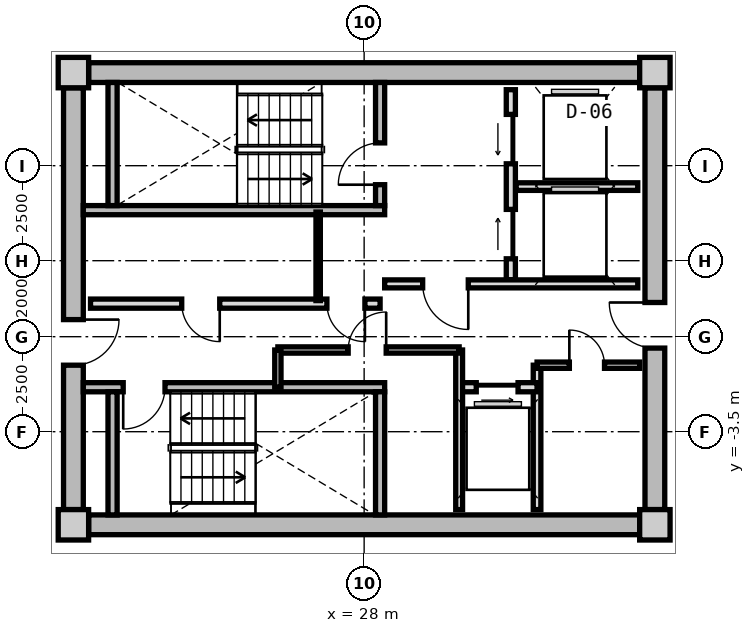
"""IFC4 building model, lengths in metres.
Left out: names, types, materials, properties, quantities, classifications, styles, units other than length and angle.
Written with IfcOpenShell. Run it as: python <this file> out.ifc"""

import sys

from ifc_helpers import new_model, si_unit, direction, frame, frame_2d, origin, origin_2d, place, context, subcontext, project, spatial, rectangle, extrude, source, transform, mapped, element, fill, save


model = new_model("IFC4")
c1 = context("Model", 3, precision=1e-05, world=origin(), true_north=direction((0.0, 1.0)))
c2 = subcontext(c1, "Body", "Model", "MODEL_VIEW")
j1 = project(units=[si_unit("LENGTHUNIT", "METRE"), si_unit("PLANEANGLEUNIT", "RADIAN")], contexts=[c1])
p1 = place(None, origin())
s1 = spatial("IfcSite", under=j1, at=p1, CompositionType="ELEMENT")
p2 = place(p1, origin())
s2 = spatial("IfcBuilding", under=s1, at=p2, CompositionType="ELEMENT")
p3 = place(p2, frame((0.0, 0.0, 232.2)))
s3 = spatial("IfcBuildingStorey", under=s2, at=p3, CompositionType="ELEMENT", Elevation=232.2)
m1 = source(origin(), c2, "Body", "SweptSolid", [
    extrude(rectangle(XDim=0.8, YDim=0.8, at=origin_2d()), origin(), (0.0, 0.0, 1.0), 3.05),
])
for number, where, z_axis, x_axis in (
    (1, (20.35, -5.95, 0.0), (0.0, 0.0, 1.0), (1.0, 0.0, 0.0)),
    (2, (35.65, -5.95, 0.0), (0.0, 0.0, 1.0), (1.0, 0.0, 0.0)),
    (3, (35.65, 5.95, 0.0), (0.0, 0.0, 1.0), (1.0, 0.0, 0.0)),
    (4, (20.35, 5.95, 0.0), (0.0, 0.0, 1.0), (1.0, 0.0, 0.0)),
):
    element("IfcColumn", number, at=place(p3, frame(where, z_axis=z_axis, x_axis=x_axis)), inside=s3, PredefinedType="COLUMN", context=c2, shape_type="MappedRepresentation", body=[
        mapped(m1, transform((0.0, 0.0, 0.0), x_axis=(1.0, 0.0, 0.0), y_axis=(0.0, 1.0, 0.0), z_axis=(0.0, 0.0, 1.0), scale=1.0)),
    ])
m2 = source(origin(), c2, "Body", "SweptSolid", [
    extrude(rectangle(XDim=14.5, YDim=0.52, at=frame_2d((7.25, 0.0))), origin(), (0.0, 0.0, 1.0), 2.81),
])
for number, where, z_axis, x_axis in (
    (5, (20.75, 5.95, 0.0), (0.0, 0.0, 1.0), (1.0, 0.0, 0.0)),
    (6, (35.25, -5.95, 0.0), (0.0, 0.0, 1.0), (-1.0, 0.0, 0.0)),
):
    element("IfcWall", number, at=place(p3, frame(where, z_axis=z_axis, x_axis=x_axis)), inside=s3, PredefinedType="SHEAR", context=c2, shape_type="MappedRepresentation", body=[
        mapped(m2, transform((0.0, 0.0, 0.0), x_axis=(1.0, 0.0, 0.0), y_axis=(0.0, 1.0, 0.0), z_axis=(0.0, 0.0, 1.0), scale=1.0)),
    ])
m3 = source(origin(), c2, "Body", "SweptSolid", [
    extrude(rectangle(XDim=11.1, YDim=0.52, at=frame_2d((5.55, 0.0))), origin(), (0.0, 0.0, 1.0), 2.81),
])
p4 = place(p3, frame((20.35, -5.55, 0.0), z_axis=(0.0, 0.0, 1.0), x_axis=(0.0, 1.0, 0.0)))
e7 = element("IfcWall", 7, at=p4, inside=s3, PredefinedType="SHEAR", context=c2, shape_type="MappedRepresentation", body=[
    mapped(m3, transform((0.0, 0.0, 0.0), x_axis=(1.0, 0.0, 0.0), y_axis=(0.0, 1.0, 0.0), z_axis=(0.0, 0.0, 1.0), scale=1.0)),
])
p5 = place(p4, frame((3.8, 0.0, 0.0)))
e8 = element("IfcOpeningElement", 8, at=p5, cuts=e7, PredefinedType="OPENING", context=c2, shape_type="SweptSolid", body=[
    extrude(rectangle(XDim=1.2, YDim=2.15, at=frame_2d((0.6, 1.075))), frame((0.0, 0.27, 0.0), z_axis=(0.0, -1.0, 0.0), x_axis=(1.0, 0.0, 0.0)), (0.0, 0.0, 1.0), 0.54),
])
p6 = place(p3, frame((35.65, 5.55, 0.0), z_axis=(0.0, 0.0, 1.0), x_axis=(0.0, -1.0, 0.0)))
e9 = element("IfcWall", 9, at=p6, inside=s3, PredefinedType="SHEAR", context=c2, shape_type="MappedRepresentation", body=[
    mapped(m3, transform((0.0, 0.0, 0.0), x_axis=(1.0, 0.0, 0.0), y_axis=(0.0, 1.0, 0.0), z_axis=(0.0, 0.0, 1.0), scale=1.0)),
])
p7 = place(p6, frame((5.65, 0.0, 0.0)))
e10 = element("IfcOpeningElement", 10, at=p7, cuts=e9, PredefinedType="OPENING", context=c2, shape_type="SweptSolid", body=[
    extrude(rectangle(XDim=1.2, YDim=2.15, at=frame_2d((0.6, 1.075))), frame((0.0, 0.27, 0.0), z_axis=(0.0, -1.0, 0.0), x_axis=(1.0, 0.0, 0.0)), (0.0, 0.0, 1.0), 0.54),
])
m4 = source(origin(), c2, "Body", "SweptSolid", [
    extrude(rectangle(XDim=7.93, YDim=0.24, at=frame_2d((3.965, 0.0))), origin(), (0.0, 0.0, 1.0), 2.81),
])
p8 = place(p3, frame((20.61, 2.33, 0.0), z_axis=(0.0, 0.0, 1.0), x_axis=(1.0, 0.0, 0.0)))
e11 = element("IfcWall", 11, at=p8, inside=s3, PredefinedType="PARTITIONING", context=c2, shape_type="MappedRepresentation", body=[
    mapped(m4, transform((0.0, 0.0, 0.0), x_axis=(1.0, 0.0, 0.0), y_axis=(0.0, 1.0, 0.0), z_axis=(0.0, 0.0, 1.0), scale=1.0)),
])
m5 = source(origin(), c2, "Body", "SweptSolid", [
    extrude(rectangle(XDim=3.24, YDim=0.24, at=frame_2d((1.62, 0.0))), origin(), (0.0, 0.0, 1.0), 2.81),
])
p9 = place(p3, frame((21.38, 2.45, 0.0), z_axis=(0.0, 0.0, 1.0), x_axis=(0.0, 1.0, 0.0)))
e12 = element("IfcWall", 12, at=p9, inside=s3, PredefinedType="PARTITIONING", context=c2, shape_type="MappedRepresentation", body=[
    mapped(m5, transform((0.0, 0.0, 0.0), x_axis=(1.0, 0.0, 0.0), y_axis=(0.0, 1.0, 0.0), z_axis=(0.0, 0.0, 1.0), scale=1.0)),
])
p10 = place(p3, frame((28.42, 2.45, 0.0), z_axis=(0.0, 0.0, 1.0), x_axis=(0.0, 1.0, 0.0)))
e13 = element("IfcWall", 13, at=p10, inside=s3, PredefinedType="PARTITIONING", context=c2, shape_type="MappedRepresentation", body=[
    mapped(m5, transform((0.0, 0.0, 0.0), x_axis=(1.0, 0.0, 0.0), y_axis=(0.0, 1.0, 0.0), z_axis=(0.0, 0.0, 1.0), scale=1.0)),
])
p11 = place(p10, frame((0.55, 0.0, 0.0)))
e14 = element("IfcOpeningElement", 14, at=p11, cuts=e13, PredefinedType="OPENING", context=c2, shape_type="SweptSolid", body=[
    extrude(rectangle(XDim=1.1, YDim=2.15, at=frame_2d((0.55, 1.075))), frame((0.0, 0.13, 0.0), z_axis=(0.0, -1.0, 0.0), x_axis=(1.0, 0.0, 0.0)), (0.0, 0.0, 1.0), 0.26),
])
p12 = place(p3, frame((20.61, -2.33, 0.0), z_axis=(0.0, 0.0, 1.0), x_axis=(1.0, 0.0, 0.0)))
e15 = element("IfcWall", 15, at=p12, inside=s3, PredefinedType="PARTITIONING", context=c2, shape_type="MappedRepresentation", body=[
    mapped(m4, transform((0.0, 0.0, 0.0), x_axis=(1.0, 0.0, 0.0), y_axis=(0.0, 1.0, 0.0), z_axis=(0.0, 0.0, 1.0), scale=1.0)),
])
p13 = place(p12, frame((1.05, 0.0, 0.0)))
e16 = element("IfcOpeningElement", 16, at=p13, cuts=e15, PredefinedType="OPENING", context=c2, shape_type="SweptSolid", body=[
    extrude(rectangle(XDim=1.1, YDim=2.15, at=frame_2d((0.55, 1.075))), frame((0.0, 0.13, 0.0), z_axis=(0.0, -1.0, 0.0), x_axis=(1.0, 0.0, 0.0)), (0.0, 0.0, 1.0), 0.26),
])
for number, where, z_axis, x_axis in (
    (17, (21.38, -5.69, 0.0), (0.0, 0.0, 1.0), (0.0, 1.0, 0.0)),
    (18, (28.42, -5.69, 0.0), (0.0, 0.0, 1.0), (0.0, 1.0, 0.0)),
):
    element("IfcWall", number, at=place(p3, frame(where, z_axis=z_axis, x_axis=x_axis)), inside=s3, PredefinedType="PARTITIONING", context=c2, shape_type="MappedRepresentation", body=[
        mapped(m5, transform((0.0, 0.0, 0.0), x_axis=(1.0, 0.0, 0.0), y_axis=(0.0, 1.0, 0.0), z_axis=(0.0, 0.0, 1.0), scale=1.0)),
    ])
m6 = source(origin(), c2, "Body", "SweptSolid", [
    extrude(rectangle(XDim=5.0, YDim=0.24, at=frame_2d((2.5, 0.0))), origin(), (0.0, 0.0, 1.0), 2.795),
])
p14 = place(p3, frame((31.86, 0.5, 0.0), z_axis=(0.0, 0.0, 1.0), x_axis=(0.0, 1.0, 0.0)))
e19 = element("IfcWall", 19, at=p14, inside=s3, PredefinedType="PARTITIONING", context=c2, shape_type="MappedRepresentation", body=[
    mapped(m6, transform((0.0, 0.0, 0.0), x_axis=(1.0, 0.0, 0.0), y_axis=(0.0, 1.0, 0.0), z_axis=(0.0, 0.0, 1.0), scale=1.0)),
])
p15 = place(p14, frame((3.05, 0.0, 0.0)))
e20 = element("IfcOpeningElement", 20, at=p15, cuts=e19, PredefinedType="OPENING", context=c2, shape_type="SweptSolid", body=[
    extrude(rectangle(XDim=1.3, YDim=2.2, at=frame_2d((0.65, 1.1))), frame((0.0, 0.13, 0.0), z_axis=(0.0, -1.0, 0.0), x_axis=(1.0, 0.0, 0.0)), (0.0, 0.0, 1.0), 0.26),
])
p16 = place(p14, frame((0.55, 0.0, 0.0)))
e21 = element("IfcOpeningElement", 21, at=p16, cuts=e19, PredefinedType="OPENING", context=c2, shape_type="SweptSolid", body=[
    extrude(rectangle(XDim=1.3, YDim=2.2, at=frame_2d((0.65, 1.1))), frame((0.0, 0.13, 0.0), z_axis=(0.0, -1.0, 0.0), x_axis=(1.0, 0.0, 0.0)), (0.0, 0.0, 1.0), 0.26),
])
m7 = source(origin(), c2, "Body", "SweptSolid", [
    extrude(rectangle(XDim=3.2, YDim=0.2, at=frame_2d((1.6, 0.0))), origin(), (0.0, 0.0, 1.0), 2.795),
])
p17 = place(p3, frame((32.0, 2.95, 0.0), z_axis=(0.0, 0.0, 1.0), x_axis=(1.0, 0.0, 0.0)))
e22 = element("IfcWall", 22, at=p17, inside=s3, PredefinedType="PARTITIONING", context=c2, shape_type="MappedRepresentation", body=[
    mapped(m7, transform((0.0, 0.0, 0.0), x_axis=(1.0, 0.0, 0.0), y_axis=(0.0, 1.0, 0.0), z_axis=(0.0, 0.0, 1.0), scale=1.0)),
])
m8 = source(origin(), c2, "Body", "SweptSolid", [
    extrude(rectangle(XDim=6.66, YDim=0.21, at=frame_2d((3.33, 0.0))), origin(), (0.0, 0.0, 1.0), 2.795),
])
p18 = place(p3, frame((28.54, 0.39, 0.0), z_axis=(0.0, 0.0, 1.0), x_axis=(1.0, 0.0, 0.0)))
e23 = element("IfcWall", 23, at=p18, inside=s3, PredefinedType="PARTITIONING", context=c2, shape_type="MappedRepresentation", body=[
    mapped(m8, transform((0.0, 0.0, 0.0), x_axis=(1.0, 0.0, 0.0), y_axis=(0.0, 1.0, 0.0), z_axis=(0.0, 0.0, 1.0), scale=1.0)),
])
p19 = place(p18, frame((1.0, 0.0, 0.0)))
e24 = element("IfcOpeningElement", 24, at=p19, cuts=e23, PredefinedType="OPENING", context=c2, shape_type="SweptSolid", body=[
    extrude(rectangle(XDim=1.2, YDim=2.15, at=frame_2d((0.6, 1.075))), frame((0.0, 0.115, 0.0), z_axis=(0.0, -1.0, 0.0), x_axis=(1.0, 0.0, 0.0)), (0.0, 0.0, 1.0), 0.23),
])
m9 = source(origin(), c2, "Body", "SweptSolid", [
    extrude(rectangle(XDim=7.62, YDim=0.24, at=frame_2d((3.81, 0.0))), origin(), (0.0, 0.0, 1.0), 2.795),
])
p20 = place(p3, frame((20.8, -0.13, 0.0), z_axis=(0.0, 0.0, 1.0), x_axis=(1.0, 0.0, 0.0)))
e25 = element("IfcWall", 25, at=p20, inside=s3, PredefinedType="PARTITIONING", context=c2, shape_type="MappedRepresentation", body=[
    mapped(m9, transform((0.0, 0.0, 0.0), x_axis=(1.0, 0.0, 0.0), y_axis=(0.0, 1.0, 0.0), z_axis=(0.0, 0.0, 1.0), scale=1.0)),
])
p21 = place(p20, frame((6.22, 0.0, 0.0)))
e26 = element("IfcOpeningElement", 26, at=p21, cuts=e25, PredefinedType="OPENING", context=c2, shape_type="SweptSolid", body=[
    extrude(rectangle(XDim=1.0, YDim=2.1, at=frame_2d((0.5, 1.05))), frame((0.0, 0.13, 0.0), z_axis=(0.0, -1.0, 0.0), x_axis=(1.0, 0.0, 0.0)), (0.0, 0.0, 1.0), 0.26),
])
p22 = place(p20, frame((2.4, 0.0, 0.0)))
e27 = element("IfcOpeningElement", 27, at=p22, cuts=e25, PredefinedType="OPENING", context=c2, shape_type="SweptSolid", body=[
    extrude(rectangle(XDim=1.0, YDim=2.1, at=frame_2d((0.5, 1.05))), frame((0.0, 0.13, 0.0), z_axis=(0.0, -1.0, 0.0), x_axis=(1.0, 0.0, 0.0)), (0.0, 0.0, 1.0), 0.26),
])
m10 = source(origin(), c2, "Body", "SweptSolid", [
    extrude(rectangle(XDim=2.33, YDim=0.115, at=frame_2d((1.165, 0.0))), origin(), (0.0, 0.0, 1.0), 2.795),
])
p23 = place(p3, frame((26.79, -0.05, 0.0), z_axis=(0.0, 0.0, 1.0), x_axis=(0.0, 1.0, 0.0)))
e28 = element("IfcWall", 28, at=p23, inside=s3, PredefinedType="PARTITIONING", context=c2, shape_type="MappedRepresentation", body=[
    mapped(m10, transform((0.0, 0.0, 0.0), x_axis=(1.0, 0.0, 0.0), y_axis=(0.0, 1.0, 0.0), z_axis=(0.0, 0.0, 1.0), scale=1.0)),
])
m11 = source(origin(), c2, "Body", "SweptSolid", [
    extrude(rectangle(XDim=3.8, YDim=0.2, at=frame_2d((1.9, 0.0))), origin(), (0.0, 0.0, 1.0), 2.795),
])
p24 = place(p3, frame((32.55, -5.55, 0.0), z_axis=(0.0, 0.0, 1.0), x_axis=(0.0, 1.0, 0.0)))
e29 = element("IfcWall", 29, at=p24, inside=s3, PredefinedType="PARTITIONING", context=c2, shape_type="MappedRepresentation", body=[
    mapped(m11, transform((0.0, 0.0, 0.0), x_axis=(1.0, 0.0, 0.0), y_axis=(0.0, 1.0, 0.0), z_axis=(0.0, 0.0, 1.0), scale=1.0)),
])
m12 = source(origin(), c2, "Body", "SweptSolid", [
    extrude(rectangle(XDim=2.05, YDim=0.24, at=frame_2d((1.025, 0.0))), origin(), (0.0, 0.0, 1.0), 2.795),
])
p25 = place(p3, frame((30.5, -2.33, 0.0), z_axis=(0.0, 0.0, 1.0), x_axis=(1.0, 0.0, 0.0)))
e30 = element("IfcWall", 30, at=p25, inside=s3, PredefinedType="PARTITIONING", context=c2, shape_type="MappedRepresentation", body=[
    mapped(m12, transform((0.0, 0.0, 0.0), x_axis=(1.0, 0.0, 0.0), y_axis=(0.0, 1.0, 0.0), z_axis=(0.0, 0.0, 1.0), scale=1.0)),
])
p26 = place(p25, frame((0.45, 0.0, 0.0)))
e31 = element("IfcOpeningElement", 31, at=p26, cuts=e30, PredefinedType="OPENING", context=c2, shape_type="SweptSolid", body=[
    extrude(rectangle(XDim=1.1, YDim=2.2, at=frame_2d((0.55, 1.1))), frame((0.0, 0.13, 0.0), z_axis=(0.0, -1.0, 0.0), x_axis=(1.0, 0.0, 0.0)), (0.0, 0.0, 1.0), 0.26),
])
m13 = source(origin(), c2, "Body", "SweptSolid", [
    extrude(rectangle(XDim=4.2, YDim=0.18, at=frame_2d((2.1, 0.0))), origin(), (0.0, 0.0, 1.0), 2.795),
])
p27 = place(p3, frame((30.5, -5.55, 0.0), z_axis=(0.0, 0.0, 1.0), x_axis=(0.0, 1.0, 0.0)))
e32 = element("IfcWall", 32, at=p27, inside=s3, PredefinedType="PARTITIONING", context=c2, shape_type="MappedRepresentation", body=[
    mapped(m13, transform((0.0, 0.0, 0.0), x_axis=(1.0, 0.0, 0.0), y_axis=(0.0, 1.0, 0.0), z_axis=(0.0, 0.0, 1.0), scale=1.0)),
])
m14 = source(origin(), c2, "Body", "SweptSolid", [
    extrude(rectangle(XDim=4.77, YDim=0.165, at=frame_2d((2.385, 0.0))), origin(), (0.0, 0.0, 1.0), 2.795),
])
p28 = place(p3, frame((25.73, -1.35, 0.0), z_axis=(0.0, 0.0, 1.0), x_axis=(1.0, 0.0, 0.0)))
e33 = element("IfcWall", 33, at=p28, inside=s3, PredefinedType="PARTITIONING", context=c2, shape_type="MappedRepresentation", body=[
    mapped(m14, transform((0.0, 0.0, 0.0), x_axis=(1.0, 0.0, 0.0), y_axis=(0.0, 1.0, 0.0), z_axis=(0.0, 0.0, 1.0), scale=1.0)),
])
p29 = place(p28, frame((1.85, 0.0, 0.0)))
e34 = element("IfcOpeningElement", 34, at=p29, cuts=e33, PredefinedType="OPENING", context=c2, shape_type="SweptSolid", body=[
    extrude(rectangle(XDim=1.0, YDim=2.1, at=frame_2d((0.5, 1.05))), frame((0.0, 0.093, 0.0), z_axis=(0.0, -1.0, 0.0), x_axis=(1.0, 0.0, 0.0)), (0.0, 0.0, 1.0), 0.185),
])
m15 = source(origin(), c2, "Body", "SweptSolid", [
    extrude(rectangle(XDim=0.98, YDim=0.165, at=frame_2d((0.49, 0.0))), origin(), (0.0, 0.0, 1.0), 2.795),
])
p30 = place(p3, frame((25.73, -2.33, 0.0), z_axis=(0.0, 0.0, 1.0), x_axis=(0.0, 1.0, 0.0)))
e35 = element("IfcWall", 35, at=p30, inside=s3, PredefinedType="PARTITIONING", context=c2, shape_type="MappedRepresentation", body=[
    mapped(m15, transform((0.0, 0.0, 0.0), x_axis=(1.0, 0.0, 0.0), y_axis=(0.0, 1.0, 0.0), z_axis=(0.0, 0.0, 1.0), scale=1.0)),
])
m16 = source(origin(), c2, "Body", "SweptSolid", [
    extrude(rectangle(XDim=2.7, YDim=0.165, at=frame_2d((1.35, 0.0))), origin(), (0.0, 0.0, 1.0), 2.795),
])
p31 = place(p3, frame((32.55, -1.75, 0.0), z_axis=(0.0, 0.0, 1.0), x_axis=(1.0, 0.0, 0.0)))
e36 = element("IfcWall", 36, at=p31, inside=s3, PredefinedType="PARTITIONING", context=c2, shape_type="MappedRepresentation", body=[
    mapped(m16, transform((0.0, 0.0, 0.0), x_axis=(1.0, 0.0, 0.0), y_axis=(0.0, 1.0, 0.0), z_axis=(0.0, 0.0, 1.0), scale=1.0)),
])
p32 = place(p31, frame((0.85, 0.0, 0.0)))
e37 = element("IfcOpeningElement", 37, at=p32, cuts=e36, PredefinedType="OPENING", context=c2, shape_type="SweptSolid", body=[
    extrude(rectangle(XDim=0.925, YDim=2.1, at=frame_2d((0.462, 1.05))), frame((0.0, 0.093, 0.0), z_axis=(0.0, -1.0, 0.0), x_axis=(1.0, 0.0, 0.0)), (0.0, 0.0, 1.0), 0.185),
])
m17 = source(origin(), c2, "Body", "SweptSolid", [
    extrude(rectangle(XDim=1.1, YDim=2.15, at=frame_2d((0.55, 1.075))), frame((0.0, 0.025, 0.0), z_axis=(0.0, -1.0, 0.0), x_axis=(1.0, 0.0, 0.0)), (0.0, 0.0, 1.0), 0.05),
])
p33 = place(p11, origin())
e38 = element("IfcDoor", 38, at=p33, inside=s3, OperationType="SINGLE_SWING_LEFT", PredefinedType="DOOR", context=c2, shape_type="MappedRepresentation", body=[
    mapped(m17, transform((0.0, 0.0, 0.0), x_axis=(1.0, 0.0, 0.0), y_axis=(0.0, 1.0, 0.0), z_axis=(0.0, 0.0, 1.0), scale=1.0)),
])
fill(e14, e38)
p34 = place(p13, frame((1.1, 0.0, 0.0), z_axis=(0.0, 0.0, 1.0), x_axis=(-1.0, 0.0, 0.0)))
e39 = element("IfcDoor", 39, at=p34, inside=s3, OperationType="SINGLE_SWING_RIGHT", PredefinedType="DOOR", context=c2, shape_type="MappedRepresentation", body=[
    mapped(m17, transform((0.0, 0.0, 0.0), x_axis=(1.0, 0.0, 0.0), y_axis=(0.0, 1.0, 0.0), z_axis=(0.0, 0.0, 1.0), scale=1.0)),
])
fill(e16, e39)
m18 = source(origin(), c2, "Body", "SweptSolid", [
    extrude(rectangle(XDim=1.3, YDim=2.2, at=frame_2d((0.65, 1.1))), frame((0.0, 0.025, 0.0), z_axis=(0.0, -1.0, 0.0), x_axis=(1.0, 0.0, 0.0)), (0.0, 0.0, 1.0), 0.05),
])
p35 = place(p15, origin())
e40 = element("IfcDoor", 40, at=p35, inside=s3, OperationType="SLIDING_TO_LEFT", PredefinedType="DOOR", context=c2, shape_type="MappedRepresentation", body=[
    mapped(m18, transform((0.0, 0.0, 0.0), x_axis=(1.0, 0.0, 0.0), y_axis=(0.0, 1.0, 0.0), z_axis=(0.0, 0.0, 1.0), scale=1.0)),
])
fill(e20, e40)
p36 = place(p16, origin())
e41 = element("IfcDoor", 41, at=p36, inside=s3, OperationType="SLIDING_TO_RIGHT", PredefinedType="DOOR", context=c2, shape_type="MappedRepresentation", body=[
    mapped(m18, transform((0.0, 0.0, 0.0), x_axis=(1.0, 0.0, 0.0), y_axis=(0.0, 1.0, 0.0), z_axis=(0.0, 0.0, 1.0), scale=1.0)),
])
fill(e21, e41)
m19 = source(origin(), c2, "Body", "SweptSolid", [
    extrude(rectangle(XDim=1.2, YDim=2.15, at=frame_2d((0.6, 1.075))), frame((0.0, 0.025, 0.0), z_axis=(0.0, -1.0, 0.0), x_axis=(1.0, 0.0, 0.0)), (0.0, 0.0, 1.0), 0.05),
])
p37 = place(p19, frame((1.2, 0.0, 0.0), z_axis=(0.0, 0.0, 1.0), x_axis=(-1.0, 0.0, 0.0)))
e42 = element("IfcDoor", 42, at=p37, inside=s3, OperationType="SINGLE_SWING_LEFT", PredefinedType="DOOR", context=c2, shape_type="MappedRepresentation", body=[
    mapped(m19, transform((0.0, 0.0, 0.0), x_axis=(1.0, 0.0, 0.0), y_axis=(0.0, 1.0, 0.0), z_axis=(0.0, 0.0, 1.0), scale=1.0)),
])
fill(e24, e42)
p38 = place(p5, frame((1.2, 0.0, 0.0), z_axis=(0.0, 0.0, 1.0), x_axis=(-1.0, 0.0, 0.0)))
e43 = element("IfcDoor", 43, at=p38, inside=s3, OperationType="SINGLE_SWING_LEFT", PredefinedType="DOOR", context=c2, shape_type="MappedRepresentation", body=[
    mapped(m19, transform((0.0, 0.0, 0.0), x_axis=(1.0, 0.0, 0.0), y_axis=(0.0, 1.0, 0.0), z_axis=(0.0, 0.0, 1.0), scale=1.0)),
])
fill(e8, e43)
p39 = place(p7, frame((1.2, 0.0, 0.0), z_axis=(0.0, 0.0, 1.0), x_axis=(-1.0, 0.0, 0.0)))
e44 = element("IfcDoor", 44, at=p39, inside=s3, OperationType="SINGLE_SWING_RIGHT", PredefinedType="DOOR", context=c2, shape_type="MappedRepresentation", body=[
    mapped(m19, transform((0.0, 0.0, 0.0), x_axis=(1.0, 0.0, 0.0), y_axis=(0.0, 1.0, 0.0), z_axis=(0.0, 0.0, 1.0), scale=1.0)),
])
fill(e10, e44)
m20 = source(origin(), c2, "Body", "SweptSolid", [
    extrude(rectangle(XDim=1.0, YDim=2.1, at=frame_2d((0.5, 1.05))), frame((0.0, 0.025, 0.0), z_axis=(0.0, -1.0, 0.0), x_axis=(1.0, 0.0, 0.0)), (0.0, 0.0, 1.0), 0.05),
])
p40 = place(p21, frame((1.0, 0.0, 0.0), z_axis=(0.0, 0.0, 1.0), x_axis=(-1.0, 0.0, 0.0)))
e45 = element("IfcDoor", 45, at=p40, inside=s3, OperationType="SINGLE_SWING_LEFT", PredefinedType="DOOR", context=c2, shape_type="MappedRepresentation", body=[
    mapped(m20, transform((0.0, 0.0, 0.0), x_axis=(1.0, 0.0, 0.0), y_axis=(0.0, 1.0, 0.0), z_axis=(0.0, 0.0, 1.0), scale=1.0)),
])
fill(e26, e45)
p41 = place(p22, frame((1.0, 0.0, 0.0), z_axis=(0.0, 0.0, 1.0), x_axis=(-1.0, 0.0, 0.0)))
e46 = element("IfcDoor", 46, at=p41, inside=s3, OperationType="SINGLE_SWING_LEFT", PredefinedType="DOOR", context=c2, shape_type="MappedRepresentation", body=[
    mapped(m20, transform((0.0, 0.0, 0.0), x_axis=(1.0, 0.0, 0.0), y_axis=(0.0, 1.0, 0.0), z_axis=(0.0, 0.0, 1.0), scale=1.0)),
])
fill(e27, e46)
m21 = source(origin(), c2, "Body", "SweptSolid", [
    extrude(rectangle(XDim=1.1, YDim=2.2, at=frame_2d((0.55, 1.1))), frame((0.0, 0.025, 0.0), z_axis=(0.0, -1.0, 0.0), x_axis=(1.0, 0.0, 0.0)), (0.0, 0.0, 1.0), 0.05),
])
p42 = place(p26, frame((1.1, 0.0, 0.0), z_axis=(0.0, 0.0, 1.0), x_axis=(-1.0, 0.0, 0.0)))
e47 = element("IfcDoor", 47, at=p42, inside=s3, OperationType="SLIDING_TO_RIGHT", PredefinedType="DOOR", context=c2, shape_type="MappedRepresentation", body=[
    mapped(m21, transform((0.0, 0.0, 0.0), x_axis=(1.0, 0.0, 0.0), y_axis=(0.0, 1.0, 0.0), z_axis=(0.0, 0.0, 1.0), scale=1.0)),
])
fill(e31, e47)
p43 = place(p29, origin())
e48 = element("IfcDoor", 48, at=p43, inside=s3, OperationType="SINGLE_SWING_RIGHT", PredefinedType="DOOR", context=c2, shape_type="MappedRepresentation", body=[
    mapped(m20, transform((0.0, 0.0, 0.0), x_axis=(1.0, 0.0, 0.0), y_axis=(0.0, 1.0, 0.0), z_axis=(0.0, 0.0, 1.0), scale=1.0)),
])
fill(e34, e48)
m22 = source(origin(), c2, "Body", "SweptSolid", [
    extrude(rectangle(XDim=0.925, YDim=2.1, at=frame_2d((0.462, 1.05))), frame((0.0, 0.025, 0.0), z_axis=(0.0, -1.0, 0.0), x_axis=(1.0, 0.0, 0.0)), (0.0, 0.0, 1.0), 0.05),
])
p44 = place(p32, origin())
e49 = element("IfcDoor", 49, at=p44, inside=s3, OperationType="SINGLE_SWING_LEFT", PredefinedType="DOOR", context=c2, shape_type="MappedRepresentation", body=[
    mapped(m22, transform((0.0, 0.0, 0.0), x_axis=(1.0, 0.0, 0.0), y_axis=(0.0, 1.0, 0.0), z_axis=(0.0, 0.0, 1.0), scale=1.0)),
])
fill(e37, e49)
save(model, sys.argv[1])
